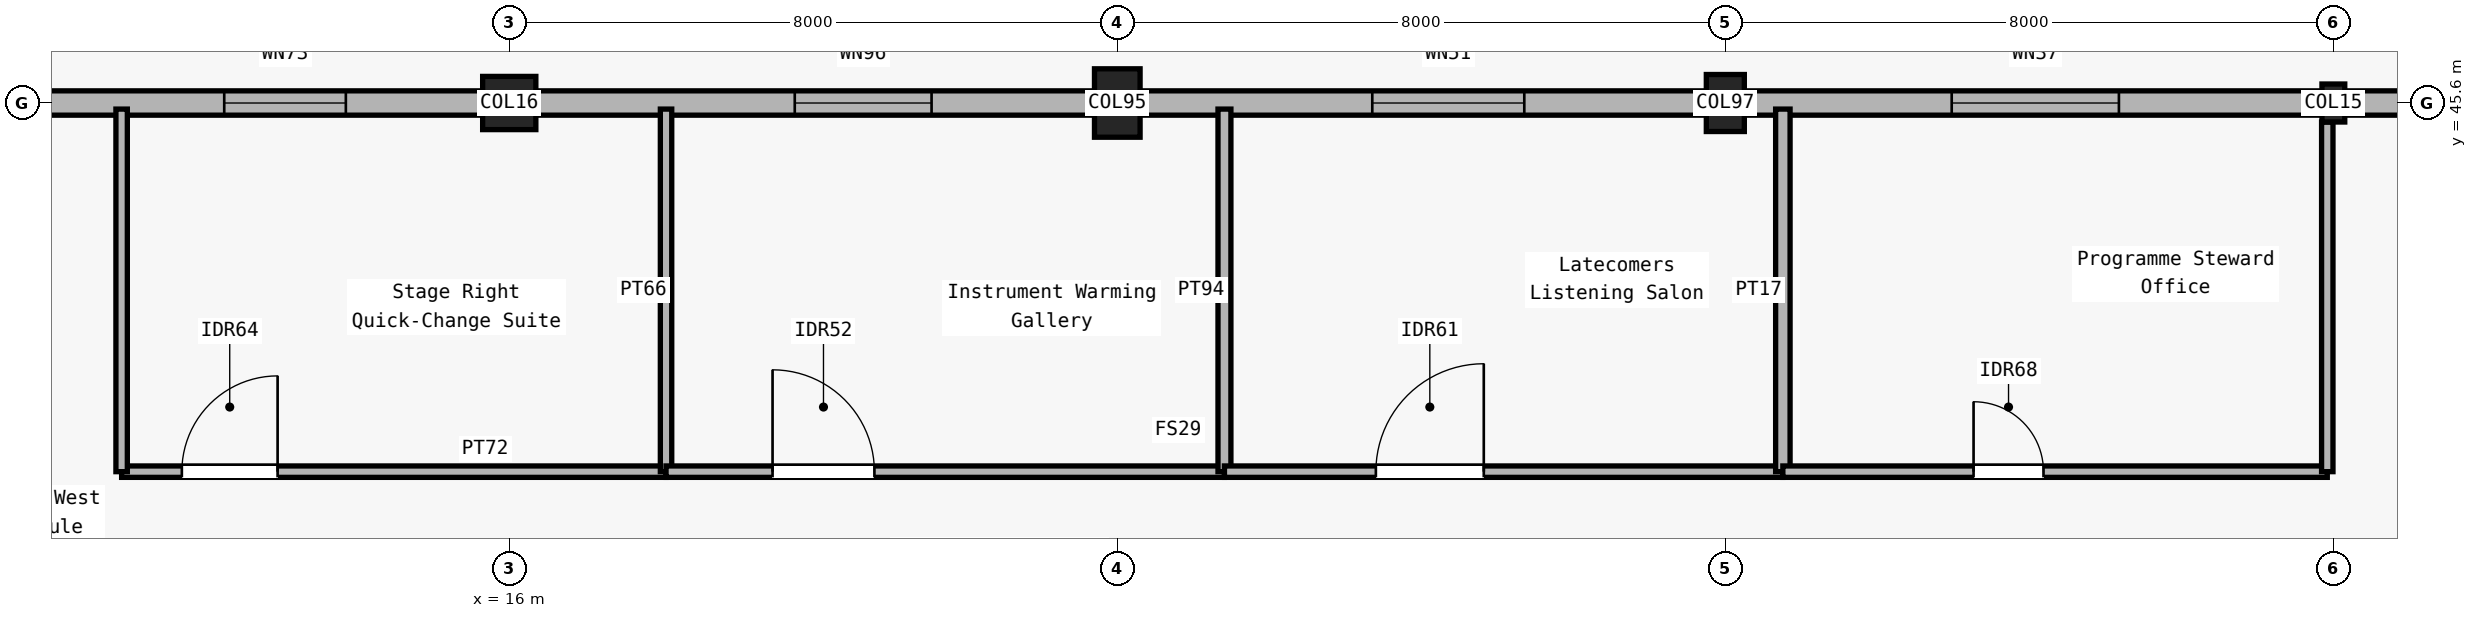
"""IFC4 building model, lengths in metres.
Left out: names, types, materials, properties, quantities, classifications, styles, units other than length and angle.
Written with IfcOpenShell. Run it as: python <this file> out.ifc"""

import sys

from ifc_helpers import new_model, si_unit, direction, frame, frame_2d, origin, origin_2d, place, context, subcontext, project, spatial, rectangle, i_section, extrude, element, fill, save


model = new_model("IFC4")
c1 = context("Model", 3, precision=1e-05, world=origin(), true_north=direction((0.0, 1.0)))
c2 = subcontext(c1, "Body", "Model", "MODEL_VIEW")
j1 = project(units=[si_unit("LENGTHUNIT", "METRE"), si_unit("PLANEANGLEUNIT", "RADIAN")], contexts=[c1])
p1 = place(None, origin())
s1 = spatial("IfcSite", under=j1, at=p1, CompositionType="ELEMENT")
p2 = place(p1, origin())
s2 = spatial("IfcBuilding", under=s1, at=p2, CompositionType="ELEMENT")
p3 = place(p2, origin())
s3 = spatial("IfcBuildingStorey", under=s2, at=p3, CompositionType="ELEMENT", Elevation=0.0)
p4 = place(p3, frame((16.0, 45.6, 0.0), z_axis=(0.0, 0.0, 1.0), x_axis=(1.0, 0.0, 0.0)))
e1 = element("IfcColumn", 1, at=p4, inside=s3, PredefinedType="COLUMN", context=c2, shape_type="SweptSolid", body=[
    extrude(rectangle(XDim=0.7, YDim=0.7, at=origin_2d()), origin(), (0.0, 0.0, 1.0), 5.4),
])
p5 = place(p3, frame((24.0, 45.6, 0.0), z_axis=(0.0, 0.0, 1.0), x_axis=(1.0, 0.0, 0.0)))
e2 = element("IfcColumn", 2, at=p5, inside=s3, PredefinedType="COLUMN", context=c2, shape_type="SweptSolid", body=[
    extrude(rectangle(XDim=0.6, YDim=0.9, at=origin_2d()), origin(), (0.0, 0.0, 1.0), 5.4),
])
p6 = place(p3, frame((32.0, 45.6, 0.0), z_axis=(0.0, 0.0, 1.0), x_axis=(1.0, 0.0, 0.0)))
e3 = element("IfcColumn", 3, at=p6, inside=s3, PredefinedType="COLUMN", context=c2, shape_type="SweptSolid", body=[
    extrude(rectangle(XDim=0.5, YDim=0.75, at=origin_2d()), origin(), (0.0, 0.0, 1.0), 5.4),
])
p7 = place(p3, frame((40.0, 45.6, 0.0), z_axis=(0.0, 0.0, 1.0), x_axis=(1.0, 0.0, 0.0)))
e4 = element("IfcColumn", 4, at=p7, inside=s3, PredefinedType="COLUMN", context=c2, shape_type="SweptSolid", body=[
    extrude(i_section(OverallWidth=0.3, OverallDepth=0.5, WebThickness=0.014, FlangeThickness=0.028, FilletRadius=0.027, at=origin_2d()), origin(), (0.0, 0.0, 1.0), 5.4),
])
p8 = place(p3, frame((8.4, 45.6, 0.0), z_axis=(0.0, 0.0, 1.0), x_axis=(1.0, 0.0, 0.0)))
e5 = element("IfcWall", 5, at=p8, inside=s3, PredefinedType="SOLIDWALL", context=c2, shape_type="SweptSolid", body=[
    extrude(rectangle(XDim=7.25, YDim=0.32, at=frame_2d((3.625, 0.0))), origin(), (0.0, 0.0, 1.0), 4.44),
])
p9 = place(p8, frame((3.85, 0.0, 0.95)))
e6 = element("IfcOpeningElement", 6, at=p9, cuts=e5, PredefinedType="OPENING", context=c2, shape_type="SweptSolid", body=[
    extrude(rectangle(XDim=1.6, YDim=1.65, at=frame_2d((0.8, 0.825))), frame((0.0, 0.17, 0.0), z_axis=(0.0, -1.0, 0.0), x_axis=(1.0, 0.0, 0.0)), (0.0, 0.0, 1.0), 0.34),
])
p10 = place(p3, frame((16.35, 45.6, 0.0), z_axis=(0.0, 0.0, 1.0), x_axis=(1.0, 0.0, 0.0)))
e7 = element("IfcWall", 7, at=p10, inside=s3, PredefinedType="SOLIDWALL", context=c2, shape_type="SweptSolid", body=[
    extrude(rectangle(XDim=7.35, YDim=0.32, at=frame_2d((3.675, 0.0))), origin(), (0.0, 0.0, 1.0), 4.44),
])
p11 = place(p10, frame((3.406, 0.0, 0.95)))
e8 = element("IfcOpeningElement", 8, at=p11, cuts=e7, PredefinedType="OPENING", context=c2, shape_type="SweptSolid", body=[
    extrude(rectangle(XDim=1.8, YDim=1.65, at=frame_2d((0.9, 0.825))), frame((0.0, 0.17, 0.0), z_axis=(0.0, -1.0, 0.0), x_axis=(1.0, 0.0, 0.0)), (0.0, 0.0, 1.0), 0.34),
])
p12 = place(p3, frame((24.3, 45.6, 0.0), z_axis=(0.0, 0.0, 1.0), x_axis=(1.0, 0.0, 0.0)))
e9 = element("IfcWall", 9, at=p12, inside=s3, PredefinedType="SOLIDWALL", context=c2, shape_type="SweptSolid", body=[
    extrude(rectangle(XDim=7.45, YDim=0.32, at=frame_2d((3.725, 0.0))), origin(), (0.0, 0.0, 1.0), 4.49),
])
p13 = place(p12, frame((3.055, 0.0, 0.95)))
e10 = element("IfcOpeningElement", 10, at=p13, cuts=e9, PredefinedType="OPENING", context=c2, shape_type="SweptSolid", body=[
    extrude(rectangle(XDim=2.0, YDim=1.65, at=frame_2d((1.0, 0.825))), frame((0.0, 0.17, 0.0), z_axis=(0.0, -1.0, 0.0), x_axis=(1.0, 0.0, 0.0)), (0.0, 0.0, 1.0), 0.34),
])
p14 = place(p3, frame((32.25, 45.6, 0.0), z_axis=(0.0, 0.0, 1.0), x_axis=(1.0, 0.0, 0.0)))
e11 = element("IfcWall", 11, at=p14, inside=s3, PredefinedType="SOLIDWALL", context=c2, shape_type="SweptSolid", body=[
    extrude(rectangle(XDim=7.6, YDim=0.32, at=frame_2d((3.8, 0.0))), origin(), (0.0, 0.0, 1.0), 3.99),
])
p15 = place(p14, frame((2.729, 0.0, 0.95)))
e12 = element("IfcOpeningElement", 12, at=p15, cuts=e11, PredefinedType="OPENING", context=c2, shape_type="SweptSolid", body=[
    extrude(rectangle(XDim=2.2, YDim=1.65, at=frame_2d((1.1, 0.825))), frame((0.0, 0.17, 0.0), z_axis=(0.0, -1.0, 0.0), x_axis=(1.0, 0.0, 0.0)), (0.0, 0.0, 1.0), 0.34),
])
p16 = place(p3, frame((40.15, 45.6, 0.0), z_axis=(0.0, 0.0, 1.0), x_axis=(1.0, 0.0, 0.0)))
e13 = element("IfcWall", 13, at=p16, inside=s3, PredefinedType="SOLIDWALL", context=c2, shape_type="SweptSolid", body=[
    extrude(rectangle(XDim=9.3, YDim=0.32, at=frame_2d((4.65, 0.0))), origin(), (0.0, 0.0, 1.0), 3.99),
])
p17 = place(p3, frame((10.9, 40.75, 0.0), z_axis=(0.0, 0.0, 1.0), x_axis=(1.0, 0.0, 0.0)))
e14 = element("IfcWall", 14, at=p17, inside=s3, PredefinedType="PARTITIONING", context=c2, shape_type="SweptSolid", body=[
    extrude(rectangle(XDim=7.163, YDim=0.15, at=frame_2d((3.582, 0.0))), origin(), (0.0, 0.0, 1.0), 4.425),
])
p18 = place(p17, frame((0.792, 0.0, 0.0)))
e15 = element("IfcOpeningElement", 15, at=p18, cuts=e14, PredefinedType="OPENING", context=c2, shape_type="SweptSolid", body=[
    extrude(rectangle(XDim=1.26, YDim=2.2, at=frame_2d((0.63, 1.1))), frame((0.0, 0.085, 0.0), z_axis=(0.0, -1.0, 0.0), x_axis=(1.0, 0.0, 0.0)), (0.0, 0.0, 1.0), 0.17),
])
p19 = place(p3, frame((18.063, 40.75, 0.0), z_axis=(0.0, 0.0, 1.0), x_axis=(0.0, 1.0, 0.0)))
e16 = element("IfcWall", 16, at=p19, inside=s3, PredefinedType="PARTITIONING", context=c2, shape_type="SweptSolid", body=[
    extrude(rectangle(XDim=4.77, YDim=0.15, at=frame_2d((2.385, 0.0))), origin(), (0.0, 0.0, 1.0), 4.495),
])
p20 = place(p3, frame((18.063, 40.75, 0.0), z_axis=(0.0, 0.0, 1.0), x_axis=(1.0, 0.0, 0.0)))
e17 = element("IfcWall", 17, at=p20, inside=s3, PredefinedType="PARTITIONING", context=c2, shape_type="SweptSolid", body=[
    extrude(rectangle(XDim=7.347, YDim=0.15, at=frame_2d((3.673, 0.0))), origin(), (0.0, 0.0, 1.0), 4.4),
])
p21 = place(p20, frame((1.401, 0.0, 0.0)))
e18 = element("IfcOpeningElement", 18, at=p21, cuts=e17, PredefinedType="OPENING", context=c2, shape_type="SweptSolid", body=[
    extrude(rectangle(XDim=1.34, YDim=2.2, at=frame_2d((0.67, 1.1))), frame((0.0, 0.085, 0.0), z_axis=(0.0, -1.0, 0.0), x_axis=(1.0, 0.0, 0.0)), (0.0, 0.0, 1.0), 0.17),
])
p22 = place(p3, frame((25.41, 40.75, 0.0), z_axis=(0.0, 0.0, 1.0), x_axis=(0.0, 1.0, 0.0)))
e19 = element("IfcWall", 19, at=p22, inside=s3, PredefinedType="PARTITIONING", context=c2, shape_type="SweptSolid", body=[
    extrude(rectangle(XDim=4.77, YDim=0.17, at=frame_2d((2.385, 0.0))), origin(), (0.0, 0.0, 1.0), 4.47),
])
p23 = place(p3, frame((25.41, 40.75, 0.0), z_axis=(0.0, 0.0, 1.0), x_axis=(1.0, 0.0, 0.0)))
e20 = element("IfcWall", 20, at=p23, inside=s3, PredefinedType="PARTITIONING", context=c2, shape_type="SweptSolid", body=[
    extrude(rectangle(XDim=7.347, YDim=0.15, at=frame_2d((3.674, 0.0))), origin(), (0.0, 0.0, 1.0), 4.475),
])
p24 = place(p23, frame((1.992, 0.0, 0.0)))
e21 = element("IfcOpeningElement", 21, at=p24, cuts=e20, PredefinedType="OPENING", context=c2, shape_type="SweptSolid", body=[
    extrude(rectangle(XDim=1.42, YDim=2.2, at=frame_2d((0.71, 1.1))), frame((0.0, 0.085, 0.0), z_axis=(0.0, -1.0, 0.0), x_axis=(1.0, 0.0, 0.0)), (0.0, 0.0, 1.0), 0.17),
])
p25 = place(p3, frame((32.757, 40.75, 0.0), z_axis=(0.0, 0.0, 1.0), x_axis=(0.0, 1.0, 0.0)))
e22 = element("IfcWall", 22, at=p25, inside=s3, PredefinedType="PARTITIONING", context=c2, shape_type="SweptSolid", body=[
    extrude(rectangle(XDim=4.77, YDim=0.19, at=frame_2d((2.385, 0.0))), origin(), (0.0, 0.0, 1.0), 4.35),
])
p26 = place(p3, frame((32.757, 40.75, 0.0), z_axis=(0.0, 0.0, 1.0), x_axis=(1.0, 0.0, 0.0)))
e23 = element("IfcWall", 23, at=p26, inside=s3, PredefinedType="PARTITIONING", context=c2, shape_type="SweptSolid", body=[
    extrude(rectangle(XDim=7.163, YDim=0.15, at=frame_2d((3.582, 0.0))), origin(), (0.0, 0.0, 1.0), 4.455),
])
p27 = place(p26, frame((2.509, 0.0, 0.0)))
e24 = element("IfcOpeningElement", 24, at=p27, cuts=e23, PredefinedType="OPENING", context=c2, shape_type="SweptSolid", body=[
    extrude(rectangle(XDim=0.92, YDim=2.05, at=frame_2d((0.46, 1.025))), frame((0.0, 0.085, 0.0), z_axis=(0.0, -1.0, 0.0), x_axis=(1.0, 0.0, 0.0)), (0.0, 0.0, 1.0), 0.17),
])
p28 = place(p3, frame((10.9, 40.75, 0.0), z_axis=(0.0, 0.0, 1.0), x_axis=(0.0, 1.0, 0.0)))
e25 = element("IfcWall", 25, at=p28, inside=s3, PredefinedType="PARTITIONING", context=c2, shape_type="SweptSolid", body=[
    extrude(rectangle(XDim=4.77, YDim=0.15, at=frame_2d((2.385, 0.0))), origin(), (0.0, 0.0, 1.0), 4.325),
])
p29 = place(p3, frame((39.92, 40.75, 0.0), z_axis=(0.0, 0.0, 1.0), x_axis=(0.0, 1.0, 0.0)))
e26 = element("IfcWall", 26, at=p29, inside=s3, PredefinedType="PARTITIONING", context=c2, shape_type="SweptSolid", body=[
    extrude(rectangle(XDim=4.6, YDim=0.15, at=frame_2d((2.3, 0.0))), origin(), (0.0, 0.0, 1.0), 3.99),
])
p30 = place(p9, origin())
e27 = element("IfcWindow", 27, at=p30, inside=s3, PartitioningType="SINGLE_PANEL", PredefinedType="WINDOW", context=c2, shape_type="SweptSolid", body=[
    extrude(rectangle(XDim=1.6, YDim=1.65, at=frame_2d((0.8, 0.825))), frame((0.0, 0.03, 0.0), z_axis=(0.0, -1.0, 0.0), x_axis=(1.0, 0.0, 0.0)), (0.0, 0.0, 1.0), 0.06),
])
fill(e6, e27)
p31 = place(p11, origin())
e28 = element("IfcWindow", 28, at=p31, inside=s3, PartitioningType="DOUBLE_PANEL_VERTICAL", PredefinedType="WINDOW", context=c2, shape_type="SweptSolid", body=[
    extrude(rectangle(XDim=1.8, YDim=1.65, at=frame_2d((0.9, 0.825))), frame((0.0, 0.03, 0.0), z_axis=(0.0, -1.0, 0.0), x_axis=(1.0, 0.0, 0.0)), (0.0, 0.0, 1.0), 0.06),
])
fill(e8, e28)
p32 = place(p13, origin())
e29 = element("IfcWindow", 29, at=p32, inside=s3, PartitioningType="DOUBLE_PANEL_VERTICAL", PredefinedType="WINDOW", context=c2, shape_type="SweptSolid", body=[
    extrude(rectangle(XDim=2.0, YDim=1.65, at=frame_2d((1.0, 0.825))), frame((0.0, 0.03, 0.0), z_axis=(0.0, -1.0, 0.0), x_axis=(1.0, 0.0, 0.0)), (0.0, 0.0, 1.0), 0.06),
])
fill(e10, e29)
p33 = place(p15, origin())
e30 = element("IfcWindow", 30, at=p33, inside=s3, PartitioningType="DOUBLE_PANEL_VERTICAL", PredefinedType="WINDOW", context=c2, shape_type="SweptSolid", body=[
    extrude(rectangle(XDim=2.2, YDim=1.65, at=frame_2d((1.1, 0.825))), frame((0.0, 0.03, 0.0), z_axis=(0.0, -1.0, 0.0), x_axis=(1.0, 0.0, 0.0)), (0.0, 0.0, 1.0), 0.06),
])
fill(e12, e30)
p34 = place(p18, origin())
e31 = element("IfcDoor", 31, at=p34, inside=s3, OperationType="SINGLE_SWING_RIGHT", PredefinedType="DOOR", context=c2, shape_type="SweptSolid", body=[
    extrude(rectangle(XDim=1.26, YDim=2.2, at=frame_2d((0.63, 1.1))), frame((0.0, 0.025, 0.0), z_axis=(0.0, -1.0, 0.0), x_axis=(1.0, 0.0, 0.0)), (0.0, 0.0, 1.0), 0.05),
])
fill(e15, e31)
p35 = place(p21, origin())
e32 = element("IfcDoor", 32, at=p35, inside=s3, OperationType="SINGLE_SWING_LEFT", PredefinedType="DOOR", context=c2, shape_type="SweptSolid", body=[
    extrude(rectangle(XDim=1.34, YDim=2.2, at=frame_2d((0.67, 1.1))), frame((0.0, 0.025, 0.0), z_axis=(0.0, -1.0, 0.0), x_axis=(1.0, 0.0, 0.0)), (0.0, 0.0, 1.0), 0.05),
])
fill(e18, e32)
p36 = place(p24, origin())
e33 = element("IfcDoor", 33, at=p36, inside=s3, OperationType="SINGLE_SWING_RIGHT", PredefinedType="DOOR", context=c2, shape_type="SweptSolid", body=[
    extrude(rectangle(XDim=1.42, YDim=2.2, at=frame_2d((0.71, 1.1))), frame((0.0, 0.025, 0.0), z_axis=(0.0, -1.0, 0.0), x_axis=(1.0, 0.0, 0.0)), (0.0, 0.0, 1.0), 0.05),
])
fill(e21, e33)
p37 = place(p27, origin())
e34 = element("IfcDoor", 34, at=p37, inside=s3, OperationType="SINGLE_SWING_LEFT", PredefinedType="DOOR", context=c2, shape_type="SweptSolid", body=[
    extrude(rectangle(XDim=0.92, YDim=2.05, at=frame_2d((0.46, 1.025))), frame((0.0, 0.025, 0.0), z_axis=(0.0, -1.0, 0.0), x_axis=(1.0, 0.0, 0.0)), (0.0, 0.0, 1.0), 0.05),
])
fill(e24, e34)
save(model, sys.argv[1])
